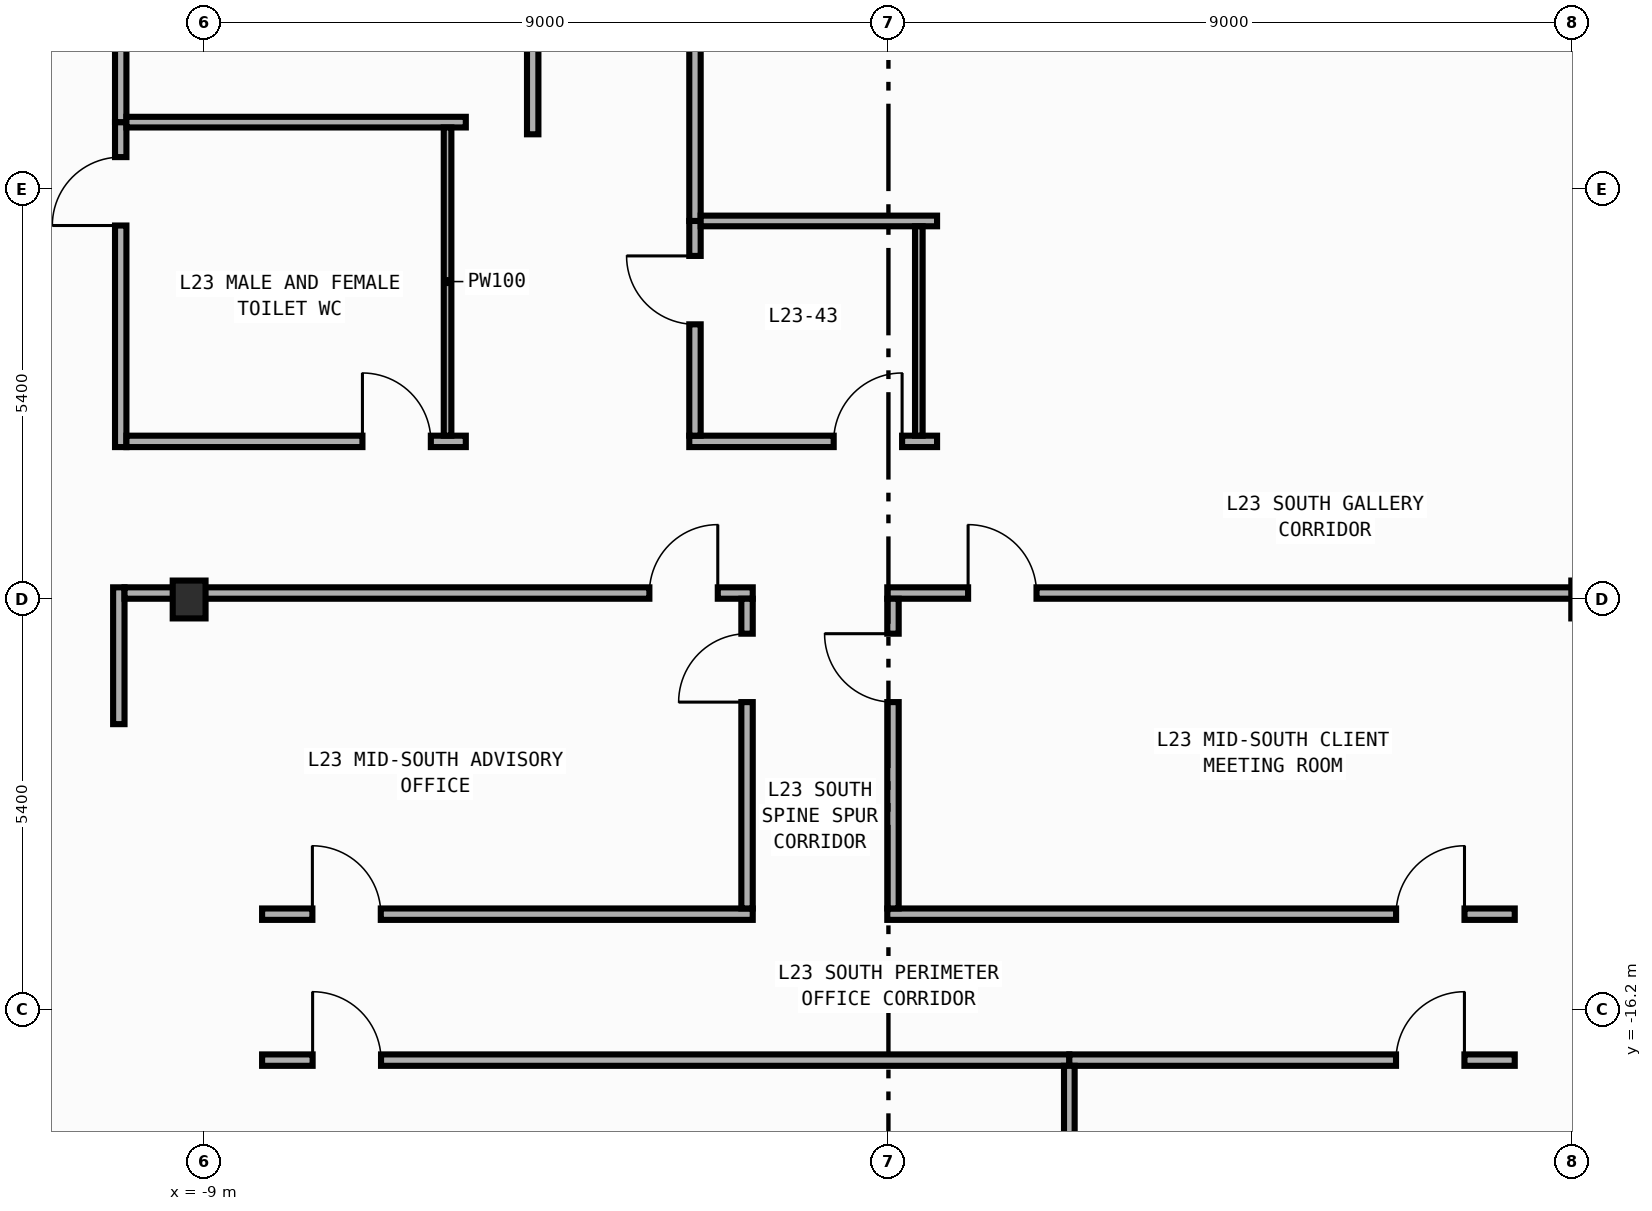
"""IFC4 building model, lengths in metres.
Left out: names, types, materials, properties, quantities, classifications, styles, units other than length and angle.
Written with IfcOpenShell. Run it as: python <this file> out.ifc"""

import sys

from ifc_helpers import new_model, si_unit, direction, frame, frame_2d, origin, origin_2d, place, context, subcontext, project, spatial, rectangle, i_section, extrude, element, fill, save


model = new_model("IFC4")
c1 = context("Model", 3, precision=1e-05, world=origin(), true_north=direction((0.0, 1.0)))
c2 = subcontext(c1, "Body", "Model", "MODEL_VIEW")
j1 = project(units=[si_unit("LENGTHUNIT", "METRE"), si_unit("PLANEANGLEUNIT", "RADIAN")], contexts=[c1])
p1 = place(None, origin())
s1 = spatial("IfcSite", under=j1, at=p1, CompositionType="ELEMENT")
p2 = place(p1, origin())
s2 = spatial("IfcBuilding", under=s1, at=p2, CompositionType="ELEMENT")
p3 = place(p2, frame((0.0, 0.0, 101.6)))
s3 = spatial("IfcBuildingStorey", under=s2, at=p3, CompositionType="ELEMENT", Elevation=101.6)
for number, where, z_axis, x_axis in (
    (1, (-9.2, -10.8, 0.0), (0.0, 0.0, 1.0), (1.0, 0.0, 0.0)),
    (2, (9.2, -10.8, 0.0), (0.0, 0.0, 1.0), (1.0, 0.0, 0.0)),
):
    element("IfcColumn", number, at=place(p3, frame(where, z_axis=z_axis, x_axis=x_axis)), inside=s3, PredefinedType="COLUMN", context=c2, shape_type="SweptSolid", body=[
        extrude(i_section(OverallWidth=0.432, OverallDepth=0.498, WebThickness=0.045, FlangeThickness=0.07, FilletRadius=0.022, at=origin_2d()), origin(), (0.0, 0.0, 1.0), 4.2),
    ])
p4 = place(p3, frame((-10.1, -8.795, 0.0), z_axis=(0.0, 0.0, 1.0), x_axis=(0.0, 1.0, 0.0)))
e3 = element("IfcWall", 3, at=p4, inside=s3, PredefinedType="PARTITIONING", context=c2, shape_type="SweptSolid", body=[
    extrude(rectangle(XDim=4.275, YDim=0.15, at=frame_2d((2.137, 0.0))), origin(), (0.0, 0.0, 1.0), 3.94),
])
p5 = place(p4, frame((2.915, 0.0, 0.0)))
e4 = element("IfcOpeningElement", 4, at=p5, cuts=e3, PredefinedType="OPENING", context=c2, shape_type="SweptSolid", body=[
    extrude(rectangle(XDim=0.9, YDim=2.15, at=frame_2d((0.45, 1.075))), frame((0.0, 0.085, 0.0), z_axis=(0.0, -1.0, 0.0), x_axis=(1.0, 0.0, 0.0)), (0.0, 0.0, 1.0), 0.17),
])
p6 = place(p3, frame((-10.1, -4.52, 0.0), z_axis=(0.0, 0.0, 1.0), x_axis=(0.0, 1.0, 0.0)))
e5 = element("IfcWall", 5, at=p6, inside=s3, PredefinedType="PARTITIONING", context=c2, shape_type="SweptSolid", body=[
    extrude(rectangle(XDim=12.315, YDim=0.15, at=frame_2d((6.157, 0.0))), origin(), (0.0, 0.0, 1.0), 3.94),
])
p7 = place(p6, frame((9.542, 0.0, 0.0)))
e6 = element("IfcOpeningElement", 6, at=p7, cuts=e5, PredefinedType="OPENING", context=c2, shape_type="SweptSolid", body=[
    extrude(rectangle(XDim=0.9, YDim=2.15, at=frame_2d((0.45, 1.075))), frame((0.0, 0.085, 0.0), z_axis=(0.0, -1.0, 0.0), x_axis=(1.0, 0.0, 0.0)), (0.0, 0.0, 1.0), 0.17),
])
p8 = place(p3, frame((-10.125, -12.44, 0.0), z_axis=(0.0, 0.0, 1.0), x_axis=(0.0, 1.0, 0.0)))
e7 = element("IfcWall", 7, at=p8, inside=s3, PredefinedType="PARTITIONING", context=c2, shape_type="SweptSolid", body=[
    extrude(rectangle(XDim=1.8, YDim=0.15, at=frame_2d((0.9, 0.0))), origin(), (0.0, 0.0, 1.0), 3.94),
])
p9 = place(p3, frame((-2.62, -8.72, 0.0), z_axis=(0.0, 0.0, 1.0), x_axis=(1.0, 0.0, 0.0)))
e8 = element("IfcWall", 8, at=p9, inside=s3, PredefinedType="PARTITIONING", context=c2, shape_type="SweptSolid", body=[
    extrude(rectangle(XDim=3.26, YDim=0.15, at=frame_2d((1.63, 0.0))), origin(), (0.0, 0.0, 1.0), 3.94),
])
p10 = place(p9, frame((1.9, 0.0, 0.0)))
e9 = element("IfcOpeningElement", 9, at=p10, cuts=e8, PredefinedType="OPENING", context=c2, shape_type="SweptSolid", body=[
    extrude(rectangle(XDim=0.9, YDim=2.15, at=frame_2d((0.45, 1.075))), frame((0.0, 0.085, 0.0), z_axis=(0.0, -1.0, 0.0), x_axis=(1.0, 0.0, 0.0)), (0.0, 0.0, 1.0), 0.17),
])
p11 = place(p3, frame((-10.025, -8.72, 0.0), z_axis=(0.0, 0.0, 1.0), x_axis=(1.0, 0.0, 0.0)))
e10 = element("IfcWall", 10, at=p11, inside=s3, PredefinedType="PARTITIONING", context=c2, shape_type="SweptSolid", body=[
    extrude(rectangle(XDim=4.465, YDim=0.15, at=frame_2d((2.232, 0.0))), origin(), (0.0, 0.0, 1.0), 3.94),
])
p12 = place(p11, frame((3.105, 0.0, 0.0)))
e11 = element("IfcOpeningElement", 11, at=p12, cuts=e10, PredefinedType="OPENING", context=c2, shape_type="SweptSolid", body=[
    extrude(rectangle(XDim=0.9, YDim=2.15, at=frame_2d((0.45, 1.075))), frame((0.0, 0.085, 0.0), z_axis=(0.0, -1.0, 0.0), x_axis=(1.0, 0.0, 0.0)), (0.0, 0.0, 1.0), 0.17),
])
p13 = place(p3, frame((-10.05, -10.715, 0.0), z_axis=(0.0, 0.0, 1.0), x_axis=(1.0, 0.0, 0.0)))
e12 = element("IfcWall", 12, at=p13, inside=s3, PredefinedType="PARTITIONING", context=c2, shape_type="SweptSolid", body=[
    extrude(rectangle(XDim=8.265, YDim=0.15, at=frame_2d((4.133, 0.0))), origin(), (0.0, 0.0, 1.0), 3.24),
])
p14 = place(p13, frame((6.905, 0.0, 0.0)))
e13 = element("IfcOpeningElement", 13, at=p14, cuts=e12, PredefinedType="OPENING", context=c2, shape_type="SweptSolid", body=[
    extrude(rectangle(XDim=0.9, YDim=2.15, at=frame_2d((0.45, 1.075))), frame((0.0, 0.085, 0.0), z_axis=(0.0, -1.0, 0.0), x_axis=(1.0, 0.0, 0.0)), (0.0, 0.0, 1.0), 0.17),
])
p15 = place(p3, frame((-0.015, -10.715, 0.0), z_axis=(0.0, 0.0, 1.0), x_axis=(1.0, 0.0, 0.0)))
e14 = element("IfcWall", 14, at=p15, inside=s3, PredefinedType="PARTITIONING", context=c2, shape_type="SweptSolid", body=[
    extrude(rectangle(XDim=10.065, YDim=0.15, at=frame_2d((5.032, 0.0))), origin(), (0.0, 0.0, 1.0), 3.24),
])
p16 = place(p15, frame((1.063, 0.0, 0.0)))
e15 = element("IfcOpeningElement", 15, at=p16, cuts=e14, PredefinedType="OPENING", context=c2, shape_type="SweptSolid", body=[
    extrude(rectangle(XDim=0.9, YDim=2.15, at=frame_2d((0.45, 1.075))), frame((0.0, 0.085, 0.0), z_axis=(0.0, -1.0, 0.0), x_axis=(1.0, 0.0, 0.0)), (0.0, 0.0, 1.0), 0.17),
])
p17 = place(p3, frame((-2.545, -8.645, 0.0), z_axis=(0.0, 0.0, 1.0), x_axis=(0.0, 1.0, 0.0)))
e16 = element("IfcWall", 16, at=p17, inside=s3, PredefinedType="PARTITIONING", context=c2, shape_type="SweptSolid", body=[
    extrude(rectangle(XDim=2.825, YDim=0.15, at=frame_2d((1.413, 0.0))), origin(), (0.0, 0.0, 1.0), 3.94),
])
p18 = place(p17, frame((1.465, 0.0, 0.0)))
e17 = element("IfcOpeningElement", 17, at=p18, cuts=e16, PredefinedType="OPENING", context=c2, shape_type="SweptSolid", body=[
    extrude(rectangle(XDim=0.9, YDim=2.15, at=frame_2d((0.45, 1.075))), frame((0.0, 0.085, 0.0), z_axis=(0.0, -1.0, 0.0), x_axis=(1.0, 0.0, 0.0)), (0.0, 0.0, 1.0), 0.17),
])
p19 = place(p3, frame((-2.545, -5.82, 0.0), z_axis=(0.0, 0.0, 1.0), x_axis=(0.0, 1.0, 0.0)))
e18 = element("IfcWall", 18, at=p19, inside=s3, PredefinedType="PARTITIONING", context=c2, shape_type="SweptSolid", body=[
    extrude(rectangle(XDim=13.465, YDim=0.15, at=frame_2d((6.732, 0.0))), origin(), (0.0, 0.0, 1.0), 3.94),
])
p20 = place(p19, frame((10.7, 0.0, 0.0)))
e19 = element("IfcOpeningElement", 19, at=p20, cuts=e18, PredefinedType="OPENING", context=c2, shape_type="SweptSolid", body=[
    extrude(rectangle(XDim=0.9, YDim=2.15, at=frame_2d((0.45, 1.075))), frame((0.0, 0.085, 0.0), z_axis=(0.0, -1.0, 0.0), x_axis=(1.0, 0.0, 0.0)), (0.0, 0.0, 1.0), 0.17),
])
p21 = place(p3, frame((-4.68, -4.68, 0.0), z_axis=(0.0, 0.0, 1.0), x_axis=(0.0, 1.0, 0.0)))
e20 = element("IfcWall", 20, at=p21, inside=s3, PredefinedType="PARTITIONING", context=c2, shape_type="SweptSolid", body=[
    extrude(rectangle(XDim=12.325, YDim=0.15, at=frame_2d((6.163, 0.0))), origin(), (0.0, 0.0, 1.0), 3.49),
])
p22 = place(p21, frame((9.551, 0.0, 0.0)))
e21 = element("IfcOpeningElement", 21, at=p22, cuts=e20, PredefinedType="OPENING", context=c2, shape_type="SweptSolid", body=[
    extrude(rectangle(XDim=0.9, YDim=2.15, at=frame_2d((0.45, 1.075))), frame((0.0, 0.085, 0.0), z_axis=(0.0, -1.0, 0.0), x_axis=(1.0, 0.0, 0.0)), (0.0, 0.0, 1.0), 0.17),
])
p23 = place(p3, frame((-8.24, -16.86, 0.0), z_axis=(0.0, 0.0, 1.0), x_axis=(1.0, 0.0, 0.0)))
e22 = element("IfcWall", 22, at=p23, inside=s3, PredefinedType="PARTITIONING", context=c2, shape_type="SweptSolid", body=[
    extrude(rectangle(XDim=10.62, YDim=0.15, at=frame_2d((5.31, 0.0))), origin(), (0.0, 0.0, 1.0), 3.94),
])
p24 = place(p23, frame((0.665, 0.0, 0.0)))
e23 = element("IfcOpeningElement", 23, at=p24, cuts=e22, PredefinedType="OPENING", context=c2, shape_type="SweptSolid", body=[
    extrude(rectangle(XDim=0.9, YDim=2.15, at=frame_2d((0.45, 1.075))), frame((0.0, 0.085, 0.0), z_axis=(0.0, -1.0, 0.0), x_axis=(1.0, 0.0, 0.0)), (0.0, 0.0, 1.0), 0.17),
])
p25 = place(p3, frame((2.38, -16.86, 0.0), z_axis=(0.0, 0.0, 1.0), x_axis=(1.0, 0.0, 0.0)))
e24 = element("IfcWall", 24, at=p25, inside=s3, PredefinedType="PARTITIONING", context=c2, shape_type="SweptSolid", body=[
    extrude(rectangle(XDim=5.86, YDim=0.15, at=frame_2d((2.93, 0.0))), origin(), (0.0, 0.0, 1.0), 3.94),
])
p26 = place(p25, frame((4.298, 0.0, 0.0)))
e25 = element("IfcOpeningElement", 25, at=p26, cuts=e24, PredefinedType="OPENING", context=c2, shape_type="SweptSolid", body=[
    extrude(rectangle(XDim=0.9, YDim=2.15, at=frame_2d((0.45, 1.075))), frame((0.0, 0.085, 0.0), z_axis=(0.0, -1.0, 0.0), x_axis=(1.0, 0.0, 0.0)), (0.0, 0.0, 1.0), 0.17),
])
p27 = place(p3, frame((-8.24, -14.94, 0.0), z_axis=(0.0, 0.0, 1.0), x_axis=(1.0, 0.0, 0.0)))
e26 = element("IfcWall", 26, at=p27, inside=s3, PredefinedType="PARTITIONING", context=c2, shape_type="SweptSolid", body=[
    extrude(rectangle(XDim=6.455, YDim=0.15, at=frame_2d((3.228, 0.0))), origin(), (0.0, 0.0, 1.0), 3.94),
])
p28 = place(p27, frame((0.662, 0.0, 0.0)))
e27 = element("IfcOpeningElement", 27, at=p28, cuts=e26, PredefinedType="OPENING", context=c2, shape_type="SweptSolid", body=[
    extrude(rectangle(XDim=0.9, YDim=2.15, at=frame_2d((0.45, 1.075))), frame((0.0, 0.085, 0.0), z_axis=(0.0, -1.0, 0.0), x_axis=(1.0, 0.0, 0.0)), (0.0, 0.0, 1.0), 0.17),
])
p29 = place(p3, frame((-0.015, -14.94, 0.0), z_axis=(0.0, 0.0, 1.0), x_axis=(1.0, 0.0, 0.0)))
e28 = element("IfcWall", 28, at=p29, inside=s3, PredefinedType="PARTITIONING", context=c2, shape_type="SweptSolid", body=[
    extrude(rectangle(XDim=8.255, YDim=0.15, at=frame_2d((4.127, 0.0))), origin(), (0.0, 0.0, 1.0), 3.94),
])
p30 = place(p29, frame((6.694, 0.0, 0.0)))
e29 = element("IfcOpeningElement", 29, at=p30, cuts=e28, PredefinedType="OPENING", context=c2, shape_type="SweptSolid", body=[
    extrude(rectangle(XDim=0.9, YDim=2.15, at=frame_2d((0.45, 1.075))), frame((0.0, 0.085, 0.0), z_axis=(0.0, -1.0, 0.0), x_axis=(1.0, 0.0, 0.0)), (0.0, 0.0, 1.0), 0.17),
])
p31 = place(p3, frame((-1.86, -14.865, 0.0), z_axis=(0.0, 0.0, 1.0), x_axis=(0.0, 1.0, 0.0)))
e30 = element("IfcWall", 30, at=p31, inside=s3, PredefinedType="PARTITIONING", context=c2, shape_type="SweptSolid", body=[
    extrude(rectangle(XDim=4.075, YDim=0.15, at=frame_2d((2.038, 0.0))), origin(), (0.0, 0.0, 1.0), 3.94),
])
p32 = place(p31, frame((2.715, 0.0, 0.0)))
e31 = element("IfcOpeningElement", 31, at=p32, cuts=e30, PredefinedType="OPENING", context=c2, shape_type="SweptSolid", body=[
    extrude(rectangle(XDim=0.9, YDim=2.15, at=frame_2d((0.45, 1.075))), frame((0.0, 0.085, 0.0), z_axis=(0.0, -1.0, 0.0), x_axis=(1.0, 0.0, 0.0)), (0.0, 0.0, 1.0), 0.17),
])
p33 = place(p3, frame((0.06, -14.865, 0.0), z_axis=(0.0, 0.0, 1.0), x_axis=(0.0, 1.0, 0.0)))
e32 = element("IfcWall", 32, at=p33, inside=s3, PredefinedType="PARTITIONING", context=c2, shape_type="SweptSolid", body=[
    extrude(rectangle(XDim=4.075, YDim=0.15, at=frame_2d((2.038, 0.0))), origin(), (0.0, 0.0, 1.0), 3.94),
])
p34 = place(p33, frame((2.715, 0.0, 0.0)))
e33 = element("IfcOpeningElement", 33, at=p34, cuts=e32, PredefinedType="OPENING", context=c2, shape_type="SweptSolid", body=[
    extrude(rectangle(XDim=0.9, YDim=2.15, at=frame_2d((0.45, 1.075))), frame((0.0, 0.085, 0.0), z_axis=(0.0, -1.0, 0.0), x_axis=(1.0, 0.0, 0.0)), (0.0, 0.0, 1.0), 0.17),
])
p35 = place(p3, frame((2.38, -26.055, 0.0), z_axis=(0.0, 0.0, 1.0), x_axis=(0.0, 1.0, 0.0)))
e34 = element("IfcWall", 34, at=p35, inside=s3, PredefinedType="PARTITIONING", context=c2, shape_type="SweptSolid", body=[
    extrude(rectangle(XDim=9.12, YDim=0.14, at=frame_2d((4.56, 0.0))), origin(), (0.0, 0.0, 1.0), 3.94),
])
p36 = place(p3, frame((-2.47, -5.82, 0.0), z_axis=(0.0, 0.0, 1.0), x_axis=(1.0, 0.0, 0.0)))
e35 = element("IfcWall", 35, at=p36, inside=s3, PredefinedType="PARTITIONING", context=c2, shape_type="SweptSolid", body=[
    extrude(rectangle(XDim=3.11, YDim=0.14, at=frame_2d((1.555, 0.0))), origin(), (0.0, 0.0, 1.0), 3.94),
])
p37 = place(p3, frame((-10.025, -4.52, 0.0), z_axis=(0.0, 0.0, 1.0), x_axis=(1.0, 0.0, 0.0)))
e36 = element("IfcWall", 36, at=p37, inside=s3, PredefinedType="PARTITIONING", context=c2, shape_type="SweptSolid", body=[
    extrude(rectangle(XDim=4.465, YDim=0.14, at=frame_2d((2.232, 0.0))), origin(), (0.0, 0.0, 1.0), 3.94),
])
p38 = place(p3, frame((0.4, -5.89, 0.0), z_axis=(0.0, 0.0, 1.0), x_axis=(0.0, -1.0, 0.0)))
e37 = element("IfcWall", 37, at=p38, inside=s3, PredefinedType="PARTITIONING", context=c2, shape_type="SweptSolid", body=[
    extrude(rectangle(XDim=2.755, YDim=0.1, at=frame_2d((1.377, 0.0))), origin(), (0.0, 0.0, 1.0), 3.94),
])
p39 = place(p3, frame((-5.8, -4.59, 0.0), z_axis=(0.0, 0.0, 1.0), x_axis=(0.0, -1.0, 0.0)))
e38 = element("IfcWall", 38, at=p39, inside=s3, PredefinedType="PARTITIONING", context=c2, shape_type="SweptSolid", body=[
    extrude(rectangle(XDim=4.055, YDim=0.1, at=frame_2d((2.027, 0.0))), origin(), (0.0, 0.0, 1.0), 3.94),
])
p40 = place(p5, origin())
e39 = element("IfcDoor", 39, at=p40, inside=s3, OperationType="SINGLE_SWING_LEFT", PredefinedType="DOOR", context=c2, shape_type="SweptSolid", body=[
    extrude(rectangle(XDim=0.9, YDim=2.15, at=frame_2d((0.45, 1.075))), frame((0.0, 0.025, 0.0), z_axis=(0.0, -1.0, 0.0), x_axis=(1.0, 0.0, 0.0)), (0.0, 0.0, 1.0), 0.05),
])
fill(e4, e39)
p41 = place(p10, origin())
e40 = element("IfcDoor", 40, at=p41, inside=s3, OperationType="SINGLE_SWING_RIGHT", PredefinedType="DOOR", context=c2, shape_type="SweptSolid", body=[
    extrude(rectangle(XDim=0.9, YDim=2.15, at=frame_2d((0.45, 1.075))), frame((0.0, 0.025, 0.0), z_axis=(0.0, -1.0, 0.0), x_axis=(1.0, 0.0, 0.0)), (0.0, 0.0, 1.0), 0.05),
])
fill(e9, e40)
p42 = place(p12, origin())
e41 = element("IfcDoor", 41, at=p42, inside=s3, OperationType="SINGLE_SWING_LEFT", PredefinedType="DOOR", context=c2, shape_type="SweptSolid", body=[
    extrude(rectangle(XDim=0.9, YDim=2.15, at=frame_2d((0.45, 1.075))), frame((0.0, 0.025, 0.0), z_axis=(0.0, -1.0, 0.0), x_axis=(1.0, 0.0, 0.0)), (0.0, 0.0, 1.0), 0.05),
])
fill(e11, e41)
p43 = place(p14, origin())
e42 = element("IfcDoor", 42, at=p43, inside=s3, OperationType="SINGLE_SWING_RIGHT", PredefinedType="DOOR", context=c2, shape_type="SweptSolid", body=[
    extrude(rectangle(XDim=0.9, YDim=2.15, at=frame_2d((0.45, 1.075))), frame((0.0, 0.025, 0.0), z_axis=(0.0, -1.0, 0.0), x_axis=(1.0, 0.0, 0.0)), (0.0, 0.0, 1.0), 0.05),
])
fill(e13, e42)
p44 = place(p16, origin())
e43 = element("IfcDoor", 43, at=p44, inside=s3, OperationType="SINGLE_SWING_LEFT", PredefinedType="DOOR", context=c2, shape_type="SweptSolid", body=[
    extrude(rectangle(XDim=0.9, YDim=2.15, at=frame_2d((0.45, 1.075))), frame((0.0, 0.025, 0.0), z_axis=(0.0, -1.0, 0.0), x_axis=(1.0, 0.0, 0.0)), (0.0, 0.0, 1.0), 0.05),
])
fill(e15, e43)
p45 = place(p18, origin())
e44 = element("IfcDoor", 44, at=p45, inside=s3, OperationType="SINGLE_SWING_RIGHT", PredefinedType="DOOR", context=c2, shape_type="SweptSolid", body=[
    extrude(rectangle(XDim=0.9, YDim=2.15, at=frame_2d((0.45, 1.075))), frame((0.0, 0.025, 0.0), z_axis=(0.0, -1.0, 0.0), x_axis=(1.0, 0.0, 0.0)), (0.0, 0.0, 1.0), 0.05),
])
fill(e17, e44)
p46 = place(p24, origin())
e45 = element("IfcDoor", 45, at=p46, inside=s3, OperationType="SINGLE_SWING_LEFT", PredefinedType="DOOR", context=c2, shape_type="SweptSolid", body=[
    extrude(rectangle(XDim=0.9, YDim=2.15, at=frame_2d((0.45, 1.075))), frame((0.0, 0.025, 0.0), z_axis=(0.0, -1.0, 0.0), x_axis=(1.0, 0.0, 0.0)), (0.0, 0.0, 1.0), 0.05),
])
fill(e23, e45)
p47 = place(p26, origin())
e46 = element("IfcDoor", 46, at=p47, inside=s3, OperationType="SINGLE_SWING_RIGHT", PredefinedType="DOOR", context=c2, shape_type="SweptSolid", body=[
    extrude(rectangle(XDim=0.9, YDim=2.15, at=frame_2d((0.45, 1.075))), frame((0.0, 0.025, 0.0), z_axis=(0.0, -1.0, 0.0), x_axis=(1.0, 0.0, 0.0)), (0.0, 0.0, 1.0), 0.05),
])
fill(e25, e46)
p48 = place(p28, origin())
e47 = element("IfcDoor", 47, at=p48, inside=s3, OperationType="SINGLE_SWING_LEFT", PredefinedType="DOOR", context=c2, shape_type="SweptSolid", body=[
    extrude(rectangle(XDim=0.9, YDim=2.15, at=frame_2d((0.45, 1.075))), frame((0.0, 0.025, 0.0), z_axis=(0.0, -1.0, 0.0), x_axis=(1.0, 0.0, 0.0)), (0.0, 0.0, 1.0), 0.05),
])
fill(e27, e47)
p49 = place(p30, origin())
e48 = element("IfcDoor", 48, at=p49, inside=s3, OperationType="SINGLE_SWING_RIGHT", PredefinedType="DOOR", context=c2, shape_type="SweptSolid", body=[
    extrude(rectangle(XDim=0.9, YDim=2.15, at=frame_2d((0.45, 1.075))), frame((0.0, 0.025, 0.0), z_axis=(0.0, -1.0, 0.0), x_axis=(1.0, 0.0, 0.0)), (0.0, 0.0, 1.0), 0.05),
])
fill(e29, e48)
p50 = place(p32, origin())
e49 = element("IfcDoor", 49, at=p50, inside=s3, OperationType="SINGLE_SWING_LEFT", PredefinedType="DOOR", context=c2, shape_type="SweptSolid", body=[
    extrude(rectangle(XDim=0.9, YDim=2.15, at=frame_2d((0.45, 1.075))), frame((0.0, 0.025, 0.0), z_axis=(0.0, -1.0, 0.0), x_axis=(1.0, 0.0, 0.0)), (0.0, 0.0, 1.0), 0.05),
])
fill(e31, e49)
p51 = place(p34, origin())
e50 = element("IfcDoor", 50, at=p51, inside=s3, OperationType="SINGLE_SWING_RIGHT", PredefinedType="DOOR", context=c2, shape_type="SweptSolid", body=[
    extrude(rectangle(XDim=0.9, YDim=2.15, at=frame_2d((0.45, 1.075))), frame((0.0, 0.025, 0.0), z_axis=(0.0, -1.0, 0.0), x_axis=(1.0, 0.0, 0.0)), (0.0, 0.0, 1.0), 0.05),
])
fill(e33, e50)
save(model, sys.argv[1])
